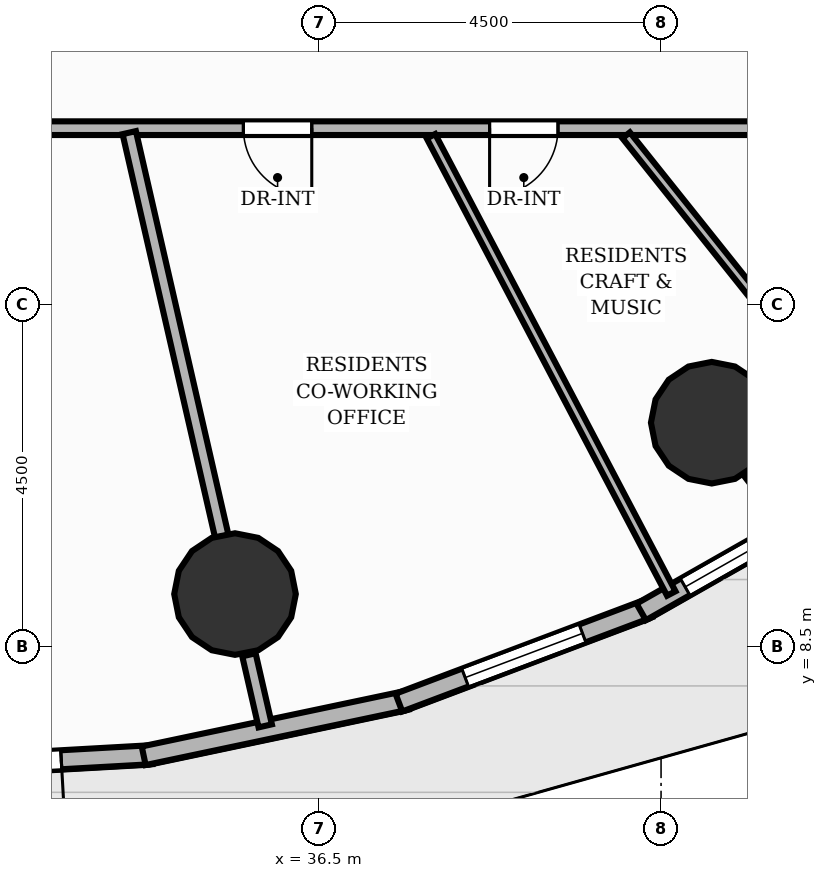
"""IFC4 building model, lengths in metres.
Left out: names, types, materials, properties, quantities, classifications, styles, units other than length and angle.
Written with IfcOpenShell. Run it as: python <this file> out.ifc"""

import sys

from ifc_helpers import new_model, si_unit, direction, frame, frame_2d, origin, origin_2d, place, context, subcontext, project, spatial, rectangle, circle, extrude, element, fill, save


model = new_model("IFC4")
c1 = context("Model", 3, precision=1e-05, world=origin(), true_north=direction((0.0, 1.0)))
c2 = subcontext(c1, "Body", "Model", "MODEL_VIEW")
j1 = project(units=[si_unit("LENGTHUNIT", "METRE"), si_unit("PLANEANGLEUNIT", "RADIAN")], contexts=[c1])
p1 = place(None, origin())
s1 = spatial("IfcSite", under=j1, at=p1, CompositionType="ELEMENT")
p2 = place(p1, origin())
s2 = spatial("IfcBuilding", under=s1, at=p2, CompositionType="ELEMENT")
p3 = place(p2, frame((0.0, 0.0, 40.8)))
s3 = spatial("IfcBuildingStorey", under=s2, at=p3, CompositionType="ELEMENT", Elevation=40.8)
for number, where, z_axis, x_axis in (
    (1, (35.395, 9.19, 0.0), (0.0, 0.0, 1.0), (1.0, 0.0, 0.0)),
    (2, (41.667, 11.445, 0.0), (0.0, 0.0, 1.0), (1.0, 0.0, 0.0)),
):
    element("IfcColumn", number, at=place(p3, frame(where, z_axis=z_axis, x_axis=x_axis)), inside=s3, PredefinedType="COLUMN", context=c2, shape_type="SweptSolid", body=[
        extrude(circle(Radius=0.8, at=origin_2d()), origin(), (0.0, 0.0, 1.0), 3.2),
    ])
p4 = place(p3, frame((34.301, 7.077, 0.0), z_axis=(0.0, 0.0, 1.0), x_axis=(-0.998425121055, -0.056100602904, 0.0)))
e3 = element("IfcWall", 3, at=p4, inside=s3, PredefinedType="SOLIDWALL", context=c2, shape_type="SweptSolid", body=[
    extrude(rectangle(XDim=3.538, YDim=0.25, at=frame_2d((1.769, 0.0))), origin(), (0.0, 0.0, 1.0), 2.96),
])
p5 = place(p4, frame((1.194, 0.0, 0.0)))
e4 = element("IfcOpeningElement", 4, at=p5, cuts=e3, PredefinedType="OPENING", context=c2, shape_type="SweptSolid", body=[
    extrude(rectangle(XDim=1.15, YDim=2.2, at=frame_2d((0.575, 1.1))), frame((0.0, 0.135, 0.0), z_axis=(0.0, -1.0, 0.0), x_axis=(1.0, 0.0, 0.0)), (0.0, 0.0, 1.0), 0.27),
])
p6 = place(p3, frame((37.655, 7.792, 0.0), z_axis=(0.0, 0.0, 1.0), x_axis=(-0.978483842038, -0.206323461756, 0.0)))
e5 = element("IfcWall", 5, at=p6, inside=s3, PredefinedType="SOLIDWALL", context=c2, shape_type="SweptSolid", body=[
    extrude(rectangle(XDim=3.538, YDim=0.25, at=frame_2d((1.769, 0.0))), origin(), (0.0, 0.0, 1.0), 2.96),
])
p7 = place(p3, frame((40.838, 9.001, 0.0), z_axis=(0.0, 0.0, 1.0), x_axis=(-0.935679231508, -0.352851775857, 0.0)))
e6 = element("IfcWall", 6, at=p7, inside=s3, PredefinedType="SOLIDWALL", context=c2, shape_type="SweptSolid", body=[
    extrude(rectangle(XDim=3.513, YDim=0.25, at=frame_2d((1.756, 0.0))), origin(), (0.0, 0.0, 1.0), 2.96),
])
p8 = place(p7, frame((0.931, 0.0, 0.85)))
e7 = element("IfcOpeningElement", 7, at=p8, cuts=e6, PredefinedType="OPENING", context=c2, shape_type="SweptSolid", body=[
    extrude(rectangle(XDim=1.65, YDim=1.55, at=frame_2d((0.825, 0.775))), frame((0.0, 0.135, 0.0), z_axis=(0.0, -1.0, 0.0), x_axis=(1.0, 0.0, 0.0)), (0.0, 0.0, 1.0), 0.27),
])
p9 = place(p3, frame((43.751, 10.667, 0.0), z_axis=(0.0, 0.0, 1.0), x_axis=(-0.869389832426, -0.494126825091, 0.0)))
e8 = element("IfcWall", 8, at=p9, inside=s3, PredefinedType="SOLIDWALL", context=c2, shape_type="SweptSolid", body=[
    extrude(rectangle(XDim=3.465, YDim=0.25, at=frame_2d((1.732, 0.0))), origin(), (0.0, 0.0, 1.0), 2.96),
])
p10 = place(p9, frame((1.4, 0.0, 0.85)))
e9 = element("IfcOpeningElement", 9, at=p10, cuts=e8, PredefinedType="OPENING", context=c2, shape_type="SweptSolid", body=[
    extrude(rectangle(XDim=1.4, YDim=1.29, at=frame_2d((0.7, 0.645))), frame((0.0, 0.135, 0.0), z_axis=(0.0, -1.0, 0.0), x_axis=(1.0, 0.0, 0.0)), (0.0, 0.0, 1.0), 0.27),
])
p11 = place(p3, frame((35.578, 8.391, 0.0), z_axis=(0.0, 0.0, 1.0), x_axis=(0.223204870581, -0.974771555673, 0.0)))
e10 = element("IfcWall", 10, at=p11, inside=s3, PredefinedType="PARTITIONING", context=c2, shape_type="SweptSolid", body=[
    extrude(rectangle(XDim=0.959, YDim=0.18, at=frame_2d((0.479, 0.0))), origin(), (0.0, 0.0, 1.0), 2.178),
])
p12 = place(p3, frame((42.167, 10.795, 0.0), z_axis=(0.0, 0.0, 1.0), x_axis=(0.609822176225, -0.792538272504, 0.0)))
e11 = element("IfcWall", 11, at=p12, inside=s3, PredefinedType="PARTITIONING", context=c2, shape_type="SweptSolid", body=[
    extrude(rectangle(XDim=0.847, YDim=0.18, at=frame_2d((0.424, 0.0))), origin(), (0.0, 0.0, 1.0), 2.178),
])
p13 = place(p3, frame((42.68, 15.32, 0.0), z_axis=(0.0, 0.0, 1.0), x_axis=(-1.0, 0.0, 0.0)))
e12 = element("IfcWall", 12, at=p13, inside=s3, PredefinedType="PARTITIONING", context=c2, shape_type="SweptSolid", body=[
    extrude(rectangle(XDim=21.36, YDim=0.18, at=frame_2d((10.68, 0.0))), origin(), (0.0, 0.0, 1.0), 2.955),
])
p14 = place(p13, frame((3.036, 0.0, 0.0)))
e13 = element("IfcOpeningElement", 13, at=p14, cuts=e12, PredefinedType="OPENING", context=c2, shape_type="SweptSolid", body=[
    extrude(rectangle(XDim=0.9, YDim=2.1, at=frame_2d((0.45, 1.05))), frame((0.0, 0.1, 0.0), z_axis=(0.0, -1.0, 0.0), x_axis=(1.0, 0.0, 0.0)), (0.0, 0.0, 1.0), 0.2),
])
p15 = place(p13, frame((6.275, 0.0, 0.0)))
e14 = element("IfcOpeningElement", 14, at=p15, cuts=e12, PredefinedType="OPENING", context=c2, shape_type="SweptSolid", body=[
    extrude(rectangle(XDim=0.9, YDim=2.1, at=frame_2d((0.45, 1.05))), frame((0.0, 0.1, 0.0), z_axis=(0.0, -1.0, 0.0), x_axis=(1.0, 0.0, 0.0)), (0.0, 0.0, 1.0), 0.2),
])
p16 = place(p13, frame((14.49, 0.0, 0.0)))
e15 = element("IfcOpeningElement", 15, at=p16, cuts=e12, PredefinedType="OPENING", context=c2, shape_type="SweptSolid", body=[
    extrude(rectangle(XDim=1.05, YDim=2.15, at=frame_2d((0.525, 1.075))), frame((0.0, 0.1, 0.0), z_axis=(0.0, -1.0, 0.0), x_axis=(1.0, 0.0, 0.0)), (0.0, 0.0, 1.0), 0.2),
])
p17 = place(p3, frame((43.998, 10.897, 0.0), z_axis=(0.0, 0.0, 1.0), x_axis=(-0.623937025269, 0.781474624347, 0.0)))
e16 = element("IfcWall", 16, at=p17, inside=s3, PredefinedType="PARTITIONING", context=c2, shape_type="SweptSolid", body=[
    extrude(rectangle(XDim=5.54, YDim=0.125, at=frame_2d((2.77, 0.0))), origin(), (0.0, 0.0, 1.0), 2.955),
])
p18 = place(p3, frame((41.135, 9.197, 0.0), z_axis=(0.0, 0.0, 1.0), x_axis=(-0.465197105493, 0.885207124373, 0.0)))
e17 = element("IfcWall", 17, at=p18, inside=s3, PredefinedType="PARTITIONING", context=c2, shape_type="SweptSolid", body=[
    extrude(rectangle(XDim=6.797, YDim=0.125, at=frame_2d((3.398, 0.0))), origin(), (0.0, 0.0, 1.0), 2.955),
])
p19 = place(p3, frame((35.221, 9.948, 0.0), z_axis=(0.0, 0.0, 1.0), x_axis=(-0.223436436687, 0.974718502318, 0.0)))
e18 = element("IfcWall", 18, at=p19, inside=s3, PredefinedType="PARTITIONING", context=c2, shape_type="SweptSolid", body=[
    extrude(rectangle(XDim=5.451, YDim=0.18, at=frame_2d((2.726, 0.0))), origin(), (0.0, 0.0, 1.0), 2.178),
])
p20 = place(p5, origin())
e19 = element("IfcDoor", 19, at=p20, inside=s3, OperationType="SINGLE_SWING_LEFT", PredefinedType="DOOR", context=c2, shape_type="SweptSolid", body=[
    extrude(rectangle(XDim=1.15, YDim=2.2, at=frame_2d((0.575, 1.1))), frame((0.0, 0.025, 0.0), z_axis=(0.0, -1.0, 0.0), x_axis=(1.0, 0.0, 0.0)), (0.0, 0.0, 1.0), 0.05),
])
fill(e4, e19)
p21 = place(p8, origin())
e20 = element("IfcWindow", 20, at=p21, inside=s3, PartitioningType="SINGLE_PANEL", PredefinedType="WINDOW", context=c2, shape_type="SweptSolid", body=[
    extrude(rectangle(XDim=1.65, YDim=1.55, at=frame_2d((0.825, 0.775))), frame((0.0, 0.03, 0.0), z_axis=(0.0, -1.0, 0.0), x_axis=(1.0, 0.0, 0.0)), (0.0, 0.0, 1.0), 0.06),
])
fill(e7, e20)
p22 = place(p10, origin())
e21 = element("IfcWindow", 21, at=p22, inside=s3, PartitioningType="SINGLE_PANEL", PredefinedType="WINDOW", context=c2, shape_type="SweptSolid", body=[
    extrude(rectangle(XDim=1.4, YDim=1.29, at=frame_2d((0.7, 0.645))), frame((0.0, 0.03, 0.0), z_axis=(0.0, -1.0, 0.0), x_axis=(1.0, 0.0, 0.0)), (0.0, 0.0, 1.0), 0.06),
])
fill(e9, e21)
p23 = place(p14, origin())
e22 = element("IfcDoor", 22, at=p23, inside=s3, OperationType="SINGLE_SWING_RIGHT", PredefinedType="DOOR", context=c2, shape_type="SweptSolid", body=[
    extrude(rectangle(XDim=0.9, YDim=2.1, at=frame_2d((0.45, 1.05))), frame((0.0, 0.025, 0.0), z_axis=(0.0, -1.0, 0.0), x_axis=(1.0, 0.0, 0.0)), (0.0, 0.0, 1.0), 0.05),
])
fill(e13, e22)
p24 = place(p15, origin())
e23 = element("IfcDoor", 23, at=p24, inside=s3, OperationType="SINGLE_SWING_LEFT", PredefinedType="DOOR", context=c2, shape_type="SweptSolid", body=[
    extrude(rectangle(XDim=0.9, YDim=2.1, at=frame_2d((0.45, 1.05))), frame((0.0, 0.025, 0.0), z_axis=(0.0, -1.0, 0.0), x_axis=(1.0, 0.0, 0.0)), (0.0, 0.0, 1.0), 0.05),
])
fill(e14, e23)
save(model, sys.argv[1])
